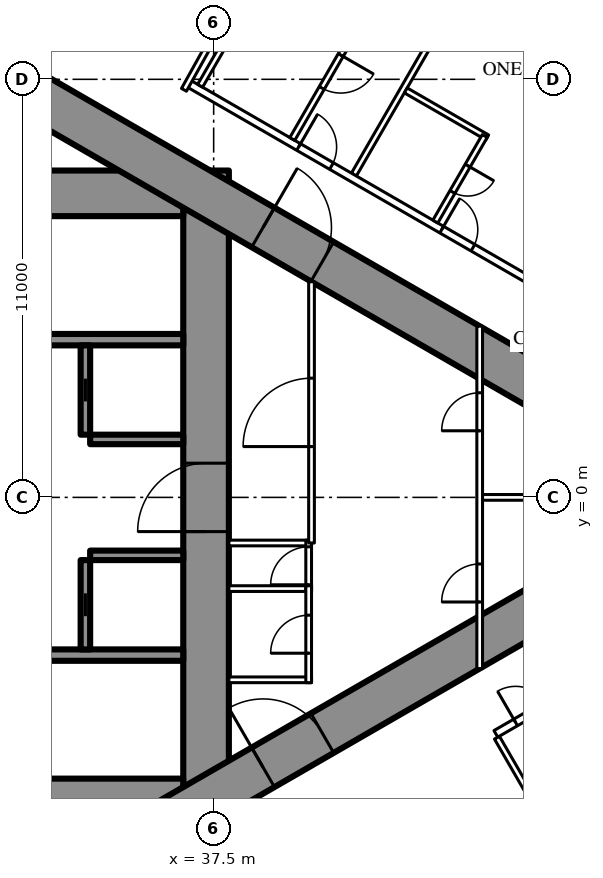
"""IFC4 building model, lengths in metres.
Left out: names, types, materials, properties, quantities, classifications, styles, units other than length and angle.
Written with IfcOpenShell. Run it as: python <this file> out.ifc"""

import sys

from ifc_helpers import new_model, si_unit, direction, frame, frame_2d, origin, place, context, subcontext, project, spatial, rectangle, extrude, element, fill, save


model = new_model("IFC4")
c1 = context("Model", 3, precision=1e-05, world=origin(), true_north=direction((0.0, 1.0)))
c2 = subcontext(c1, "Body", "Model", "MODEL_VIEW")
j1 = project(units=[si_unit("LENGTHUNIT", "METRE"), si_unit("PLANEANGLEUNIT", "RADIAN")], contexts=[c1])
p1 = place(None, origin())
s1 = spatial("IfcSite", under=j1, at=p1, CompositionType="ELEMENT")
p2 = place(p1, origin())
s2 = spatial("IfcBuilding", under=s1, at=p2, CompositionType="ELEMENT")
p3 = place(p2, frame((0.0, 0.0, 122.1)))
s3 = spatial("IfcBuildingStorey", under=s2, at=p3, CompositionType="ELEMENT", Elevation=122.1)
p4 = place(p3, frame((37.3, -8.6, 0.0), z_axis=(0.0, 0.0, 1.0), x_axis=(0.0, 1.0, 0.0)))
e1 = element("IfcWall", 1, at=p4, inside=s3, PredefinedType="SHEAR", context=c2, shape_type="SweptSolid", body=[
    extrude(rectangle(XDim=17.2, YDim=1.2, at=frame_2d((8.6, 0.0))), origin(), (0.0, 0.0, 1.0), 3.5),
])
p5 = place(p4, frame((7.7, 0.0, 0.0)))
e2 = element("IfcOpeningElement", 2, at=p5, cuts=e1, PredefinedType="OPENING", context=c2, shape_type="SweptSolid", body=[
    extrude(rectangle(XDim=1.8, YDim=2.2, at=frame_2d((0.9, 1.1))), frame((0.0, 0.61, 0.0), z_axis=(0.0, -1.0, 0.0), x_axis=(1.0, 0.0, 0.0)), (0.0, 0.0, 1.0), 1.22),
])
p6 = place(p3, frame((28.3, -8.0, 0.0), z_axis=(0.0, 0.0, 1.0), x_axis=(1.0, 0.0, 0.0)))
e3 = element("IfcWall", 3, at=p6, inside=s3, PredefinedType="SHEAR", context=c2, shape_type="SweptSolid", body=[
    extrude(rectangle(XDim=8.4, YDim=1.2, at=frame_2d((4.2, 0.0))), origin(), (0.0, 0.0, 1.0), 3.5),
])
p7 = place(p6, frame((0.25, 0.0, 0.0)))
e4 = element("IfcOpeningElement", 4, at=p7, cuts=e3, PredefinedType="OPENING", context=c2, shape_type="SweptSolid", body=[
    extrude(rectangle(XDim=1.0, YDim=2.2, at=frame_2d((0.5, 1.1))), frame((0.0, 0.61, 0.0), z_axis=(0.0, -1.0, 0.0), x_axis=(1.0, 0.0, 0.0)), (0.0, 0.0, 1.0), 1.22),
])
p8 = place(p3, frame((28.3, 8.0, 0.0), z_axis=(0.0, 0.0, 1.0), x_axis=(1.0, 0.0, 0.0)))
e5 = element("IfcWall", 5, at=p8, inside=s3, PredefinedType="SHEAR", context=c2, shape_type="SweptSolid", body=[
    extrude(rectangle(XDim=8.4, YDim=1.2, at=frame_2d((4.2, 0.0))), origin(), (0.0, 0.0, 1.0), 3.5),
])
p9 = place(p8, frame((0.25, 0.0, 0.0)))
e6 = element("IfcOpeningElement", 6, at=p9, cuts=e5, PredefinedType="OPENING", context=c2, shape_type="SweptSolid", body=[
    extrude(rectangle(XDim=1.0, YDim=2.2, at=frame_2d((0.5, 1.1))), frame((0.0, 0.61, 0.0), z_axis=(0.0, -1.0, 0.0), x_axis=(1.0, 0.0, 0.0)), (0.0, 0.0, 1.0), 1.22),
])
for number, where, z_axis, x_axis in (
    (7, (28.3, -4.15, 0.0), (0.0, 0.0, 1.0), (1.0, 0.0, 0.0)),
    (8, (28.3, 4.15, 0.0), (0.0, 0.0, 1.0), (1.0, 0.0, 0.0)),
):
    element("IfcWall", number, at=place(p3, frame(where, z_axis=z_axis, x_axis=x_axis)), inside=s3, PredefinedType="SHEAR", context=c2, shape_type="SweptSolid", body=[
        extrude(rectangle(XDim=8.4, YDim=0.3, at=frame_2d((4.2, 0.0))), origin(), (0.0, 0.0, 1.0), 3.5),
    ])
p10 = place(p3, frame((34.125, -4.0, 0.0), z_axis=(0.0, 0.0, 1.0), x_axis=(0.0, 1.0, 0.0)))
e9 = element("IfcWall", 9, at=p10, inside=s3, PredefinedType="SHEAR", context=c2, shape_type="SweptSolid", body=[
    extrude(rectangle(XDim=2.35, YDim=0.25, at=frame_2d((1.175, 0.0))), origin(), (0.0, 0.0, 1.0), 3.5),
])
p11 = place(p10, frame((0.875, 0.0, 0.0)))
e10 = element("IfcOpeningElement", 10, at=p11, cuts=e9, PredefinedType="OPENING", context=c2, shape_type="SweptSolid", body=[
    extrude(rectangle(XDim=0.6, YDim=2.0, at=frame_2d((0.3, 1.0))), frame((0.0, 0.135, 0.0), z_axis=(0.0, -1.0, 0.0), x_axis=(1.0, 0.0, 0.0)), (0.0, 0.0, 1.0), 0.27),
])
p12 = place(p3, frame((34.25, -1.525, 0.0), z_axis=(0.0, 0.0, 1.0), x_axis=(1.0, 0.0, 0.0)))
e11 = element("IfcWall", 11, at=p12, inside=s3, PredefinedType="SHEAR", context=c2, shape_type="SweptSolid", body=[
    extrude(rectangle(XDim=2.45, YDim=0.25, at=frame_2d((1.225, 0.0))), origin(), (0.0, 0.0, 1.0), 3.5),
])
p13 = place(p3, frame((34.125, 1.65, 0.0), z_axis=(0.0, 0.0, 1.0), x_axis=(0.0, 1.0, 0.0)))
e12 = element("IfcWall", 12, at=p13, inside=s3, PredefinedType="SHEAR", context=c2, shape_type="SweptSolid", body=[
    extrude(rectangle(XDim=2.35, YDim=0.25, at=frame_2d((1.175, 0.0))), origin(), (0.0, 0.0, 1.0), 3.5),
])
p14 = place(p13, frame((0.875, 0.0, 0.0)))
e13 = element("IfcOpeningElement", 13, at=p14, cuts=e12, PredefinedType="OPENING", context=c2, shape_type="SweptSolid", body=[
    extrude(rectangle(XDim=0.6, YDim=2.0, at=frame_2d((0.3, 1.0))), frame((0.0, 0.135, 0.0), z_axis=(0.0, -1.0, 0.0), x_axis=(1.0, 0.0, 0.0)), (0.0, 0.0, 1.0), 0.27),
])
p15 = place(p3, frame((34.25, 1.525, 0.0), z_axis=(0.0, 0.0, 1.0), x_axis=(1.0, 0.0, 0.0)))
e14 = element("IfcWall", 14, at=p15, inside=s3, PredefinedType="SHEAR", context=c2, shape_type="SweptSolid", body=[
    extrude(rectangle(XDim=2.45, YDim=0.25, at=frame_2d((1.225, 0.0))), origin(), (0.0, 0.0, 1.0), 3.5),
])
p16 = place(p3, frame((27.2, -13.8, 0.0), z_axis=(0.0, 0.0, 1.0), x_axis=(0.866027159892, 0.499996958321, 0.0)))
e15 = element("IfcWall", 15, at=p16, inside=s3, PredefinedType="SHEAR", context=c2, shape_type="SweptSolid", body=[
    extrude(rectangle(XDim=27.947, YDim=1.2, at=frame_2d((13.973, 0.0))), origin(), (0.0, 0.0, 1.0), 3.5),
])
p17 = place(p16, frame((4.6, 0.0, 0.0)))
e16 = element("IfcOpeningElement", 16, at=p17, cuts=e15, PredefinedType="OPENING", context=c2, shape_type="SweptSolid", body=[
    extrude(rectangle(XDim=1.0, YDim=2.2, at=frame_2d((0.5, 1.1))), frame((0.0, 0.61, 0.0), z_axis=(0.0, -1.0, 0.0), x_axis=(1.0, 0.0, 0.0)), (0.0, 0.0, 1.0), 1.22),
])
p18 = place(p16, frame((13.395, 0.0, 0.0)))
e17 = element("IfcOpeningElement", 17, at=p18, cuts=e15, PredefinedType="OPENING", context=c2, shape_type="SweptSolid", body=[
    extrude(rectangle(XDim=1.8, YDim=2.2, at=frame_2d((0.9, 1.1))), frame((0.0, 0.61, 0.0), z_axis=(0.0, -1.0, 0.0), x_axis=(1.0, 0.0, 0.0)), (0.0, 0.0, 1.0), 1.22),
])
p19 = place(p3, frame((27.2, 13.8, 0.0), z_axis=(0.0, 0.0, 1.0), x_axis=(0.866024515034, -0.500001539357, 0.0)))
e18 = element("IfcWall", 18, at=p19, inside=s3, PredefinedType="SHEAR", context=c2, shape_type="SweptSolid", body=[
    extrude(rectangle(XDim=26.907, YDim=1.2, at=frame_2d((13.454, 0.0))), origin(), (0.0, 0.0, 1.0), 3.5),
])
p20 = place(p19, frame((4.6, 0.0, 0.0)))
e19 = element("IfcOpeningElement", 19, at=p20, cuts=e18, PredefinedType="OPENING", context=c2, shape_type="SweptSolid", body=[
    extrude(rectangle(XDim=1.0, YDim=2.2, at=frame_2d((0.5, 1.1))), frame((0.0, 0.61, 0.0), z_axis=(0.0, -1.0, 0.0), x_axis=(1.0, 0.0, 0.0)), (0.0, 0.0, 1.0), 1.22),
])
p21 = place(p19, frame((13.395, 0.0, 0.0)))
e20 = element("IfcOpeningElement", 20, at=p21, cuts=e18, PredefinedType="OPENING", context=c2, shape_type="SweptSolid", body=[
    extrude(rectangle(XDim=1.8, YDim=2.2, at=frame_2d((0.9, 1.1))), frame((0.0, 0.61, 0.0), z_axis=(0.0, -1.0, 0.0), x_axis=(1.0, 0.0, 0.0)), (0.0, 0.0, 1.0), 1.22),
])
p22 = place(p3, frame((44.954, -6.321, 0.0), z_axis=(0.0, 0.0, 1.0), x_axis=(0.500018676722, -0.866014620505, 0.0)))
e21 = element("IfcWall", 21, at=p22, inside=s3, PredefinedType="PARTITIONING", context=c2, shape_type="SweptSolid", body=[
    extrude(rectangle(XDim=8.704, YDim=0.15, at=frame_2d((4.352, 0.0))), origin(), (0.0, 0.0, 1.0), 2.2),
])
p23 = place(p3, frame((41.19, 8.494, 0.0), z_axis=(0.0, 0.0, 1.0), x_axis=(0.49999258054, 0.866029687369, 0.0)))
e22 = element("IfcWall", 22, at=p23, inside=s3, PredefinedType="PARTITIONING", context=c2, shape_type="SweptSolid", body=[
    extrude(rectangle(XDim=11.318, YDim=0.15, at=frame_2d((5.659, 0.0))), origin(), (0.0, 0.0, 1.0), 3.25),
])
p24 = place(p3, frame((36.834, 10.894, 0.0), z_axis=(0.0, 0.0, 1.0), x_axis=(0.866028157229, -0.499995230863, 0.0)))
e23 = element("IfcWall", 23, at=p24, inside=s3, PredefinedType="PARTITIONING", context=c2, shape_type="SweptSolid", body=[
    extrude(rectangle(XDim=21.667, YDim=0.2, at=frame_2d((10.833, 0.0))), origin(), (0.0, 0.0, 1.0), 3.25),
])
p25 = place(p24, frame((20.117, 0.0, 0.0)))
e24 = element("IfcOpeningElement", 24, at=p25, cuts=e23, PredefinedType="OPENING", context=c2, shape_type="SweptSolid", body=[
    extrude(rectangle(XDim=0.95, YDim=2.2, at=frame_2d((0.475, 1.1))), frame((0.0, 0.11, 0.0), z_axis=(0.0, -1.0, 0.0), x_axis=(1.0, 0.0, 0.0)), (0.0, 0.0, 1.0), 0.22),
])
p26 = place(p24, frame((14.04, 0.0, 0.0)))
e25 = element("IfcOpeningElement", 25, at=p26, cuts=e23, PredefinedType="OPENING", context=c2, shape_type="SweptSolid", body=[
    extrude(rectangle(XDim=0.95, YDim=2.2, at=frame_2d((0.475, 1.1))), frame((0.0, 0.11, 0.0), z_axis=(0.0, -1.0, 0.0), x_axis=(1.0, 0.0, 0.0)), (0.0, 0.0, 1.0), 0.22),
])
p27 = place(p24, frame((7.697, 0.0, 0.0)))
e26 = element("IfcOpeningElement", 26, at=p27, cuts=e23, PredefinedType="OPENING", context=c2, shape_type="SweptSolid", body=[
    extrude(rectangle(XDim=0.95, YDim=2.2, at=frame_2d((0.475, 1.1))), frame((0.0, 0.11, 0.0), z_axis=(0.0, -1.0, 0.0), x_axis=(1.0, 0.0, 0.0)), (0.0, 0.0, 1.0), 0.22),
])
p28 = place(p24, frame((3.35, 0.0, 0.0)))
e27 = element("IfcOpeningElement", 27, at=p28, cuts=e23, PredefinedType="OPENING", context=c2, shape_type="SweptSolid", body=[
    extrude(rectangle(XDim=1.0, YDim=2.2, at=frame_2d((0.5, 1.1))), frame((0.0, 0.11, 0.0), z_axis=(0.0, -1.0, 0.0), x_axis=(1.0, 0.0, 0.0)), (0.0, 0.0, 1.0), 0.22),
])
p29 = place(p3, frame((36.719, 10.723, 0.0), z_axis=(0.0, 0.0, 1.0), x_axis=(0.486348184724, 0.87376509613, 0.0)))
e28 = element("IfcWall", 28, at=p29, inside=s3, PredefinedType="PARTITIONING", context=c2, shape_type="SweptSolid", body=[
    extrude(rectangle(XDim=1.91, YDim=0.15, at=frame_2d((0.955, 0.0))), origin(), (0.0, 0.0, 1.0), 3.25),
])
p30 = place(p3, frame((44.925, -6.222, 0.0), z_axis=(0.0, 0.0, 1.0), x_axis=(0.866020269055, 0.500008893506, 0.0)))
e29 = element("IfcWall", 29, at=p30, inside=s3, PredefinedType="PARTITIONING", context=c2, shape_type="SweptSolid", body=[
    extrude(rectangle(XDim=12.444, YDim=0.2, at=frame_2d((6.222, 0.0))), origin(), (0.0, 0.0, 1.0), 3.25),
])
p31 = place(p30, frame((0.6, 0.0, 0.0)))
e30 = element("IfcOpeningElement", 30, at=p31, cuts=e29, PredefinedType="OPENING", context=c2, shape_type="SweptSolid", body=[
    extrude(rectangle(XDim=0.95, YDim=2.2, at=frame_2d((0.475, 1.1))), frame((0.0, 0.11, 0.0), z_axis=(0.0, -1.0, 0.0), x_axis=(1.0, 0.0, 0.0)), (0.0, 0.0, 1.0), 0.22),
])
p32 = place(p30, frame((7.047, 0.0, 0.0)))
e31 = element("IfcOpeningElement", 31, at=p32, cuts=e29, PredefinedType="OPENING", context=c2, shape_type="SweptSolid", body=[
    extrude(rectangle(XDim=0.95, YDim=2.2, at=frame_2d((0.475, 1.1))), frame((0.0, 0.11, 0.0), z_axis=(0.0, -1.0, 0.0), x_axis=(1.0, 0.0, 0.0)), (0.0, 0.0, 1.0), 0.22),
])
p33 = place(p3, frame((42.555, 10.708, 0.0), z_axis=(0.0, 0.0, 1.0), x_axis=(0.866073894602, -0.499916002032, 0.0)))
e32 = element("IfcWall", 32, at=p33, inside=s3, PredefinedType="PARTITIONING", context=c2, shape_type="SweptSolid", body=[
    extrude(rectangle(XDim=2.475, YDim=0.15, at=frame_2d((1.238, 0.0))), origin(), (0.0, 0.0, 1.0), 3.25),
])
p34 = place(p3, frame((43.333, 7.257, 0.0), z_axis=(0.0, 0.0, 1.0), x_axis=(0.500006934395, 0.866021400173, 0.0)))
e33 = element("IfcWall", 33, at=p34, inside=s3, PredefinedType="PARTITIONING", context=c2, shape_type="SweptSolid", body=[
    extrude(rectangle(XDim=2.6, YDim=0.15, at=frame_2d((1.3, 0.0))), origin(), (0.0, 0.0, 1.0), 3.25),
])
p35 = place(p34, frame((0.9, 0.0, 0.0)))
e34 = element("IfcOpeningElement", 34, at=p35, cuts=e33, PredefinedType="OPENING", context=c2, shape_type="SweptSolid", body=[
    extrude(rectangle(XDim=0.8, YDim=2.2, at=frame_2d((0.4, 1.1))), frame((0.0, 0.085, 0.0), z_axis=(0.0, -1.0, 0.0), x_axis=(1.0, 0.0, 0.0)), (0.0, 0.0, 1.0), 0.17),
])
p36 = place(p3, frame((39.569, 9.43, 0.0), z_axis=(0.0, 0.0, 1.0), x_axis=(0.49998411664, 0.866034573852, 0.0)))
e35 = element("IfcWall", 35, at=p36, inside=s3, PredefinedType="PARTITIONING", context=c2, shape_type="SweptSolid", body=[
    extrude(rectangle(XDim=2.8, YDim=0.15, at=frame_2d((1.4, 0.0))), origin(), (0.0, 0.0, 1.0), 3.25),
])
p37 = place(p36, frame((1.55, 0.0, 0.0)))
e36 = element("IfcOpeningElement", 36, at=p37, cuts=e35, PredefinedType="OPENING", context=c2, shape_type="SweptSolid", body=[
    extrude(rectangle(XDim=1.0, YDim=2.2, at=frame_2d((0.5, 1.1))), frame((0.0, 0.085, 0.0), z_axis=(0.0, -1.0, 0.0), x_axis=(1.0, 0.0, 0.0)), (0.0, 0.0, 1.0), 0.17),
])
p38 = place(p3, frame((37.144, 10.83, 0.0), z_axis=(0.0, 0.0, 1.0), x_axis=(0.500011755427, 0.866018616679, 0.0)))
e37 = element("IfcWall", 37, at=p38, inside=s3, PredefinedType="PARTITIONING", context=c2, shape_type="SweptSolid", body=[
    extrude(rectangle(XDim=2.8, YDim=0.15, at=frame_2d((1.4, 0.0))), origin(), (0.0, 0.0, 1.0), 3.25),
])
for number, where, z_axis, x_axis in (
    (38, (37.9, -1.2, 0.0), (0.0, 0.0, 1.0), (1.0, 0.0, 0.0)),
    (39, (37.9, -2.4, 0.0), (0.0, 0.0, 1.0), (1.0, 0.0, 0.0)),
    (40, (37.9, -4.8, 0.0), (0.0, 0.0, 1.0), (1.0, 0.0, 0.0)),
):
    element("IfcWall", number, at=place(p3, frame(where, z_axis=z_axis, x_axis=x_axis)), inside=s3, PredefinedType="PARTITIONING", context=c2, shape_type="SweptSolid", body=[
        extrude(rectangle(XDim=2.175, YDim=0.15, at=frame_2d((1.087, 0.0))), origin(), (0.0, 0.0, 1.0), 3.25),
    ])
p39 = place(p3, frame((40.0, -2.475, 0.0), z_axis=(0.0, 0.0, 1.0), x_axis=(0.0, 1.0, 0.0)))
e41 = element("IfcWall", 41, at=p39, inside=s3, PredefinedType="PARTITIONING", context=c2, shape_type="SweptSolid", body=[
    extrude(rectangle(XDim=1.35, YDim=0.15, at=frame_2d((0.675, 0.0))), origin(), (0.0, 0.0, 1.0), 3.25),
])
p40 = place(p39, frame((0.175, 0.0, 0.0)))
e42 = element("IfcOpeningElement", 42, at=p40, cuts=e41, PredefinedType="OPENING", context=c2, shape_type="SweptSolid", body=[
    extrude(rectangle(XDim=1.0, YDim=2.2, at=frame_2d((0.5, 1.1))), frame((0.0, 0.085, 0.0), z_axis=(0.0, -1.0, 0.0), x_axis=(1.0, 0.0, 0.0)), (0.0, 0.0, 1.0), 0.17),
])
p41 = place(p3, frame((40.0, -4.875, 0.0), z_axis=(0.0, 0.0, 1.0), x_axis=(0.0, 1.0, 0.0)))
e43 = element("IfcWall", 43, at=p41, inside=s3, PredefinedType="PARTITIONING", context=c2, shape_type="SweptSolid", body=[
    extrude(rectangle(XDim=2.55, YDim=0.15, at=frame_2d((1.275, 0.0))), origin(), (0.0, 0.0, 1.0), 3.25),
])
p42 = place(p41, frame((0.775, 0.0, 0.0)))
e44 = element("IfcOpeningElement", 44, at=p42, cuts=e43, PredefinedType="OPENING", context=c2, shape_type="SweptSolid", body=[
    extrude(rectangle(XDim=1.0, YDim=2.2, at=frame_2d((0.5, 1.1))), frame((0.0, 0.085, 0.0), z_axis=(0.0, -1.0, 0.0), x_axis=(1.0, 0.0, 0.0)), (0.0, 0.0, 1.0), 0.17),
])
p43 = place(p3, frame((40.075, -1.2, 0.0), z_axis=(0.0, 0.0, 1.0), x_axis=(0.0, 1.0, 0.0)))
e45 = element("IfcWall", 45, at=p43, inside=s3, PredefinedType="PARTITIONING", context=c2, shape_type="SweptSolid", body=[
    extrude(rectangle(XDim=6.874, YDim=0.15, at=frame_2d((3.437, 0.0))), origin(), (0.0, 0.0, 1.0), 3.25),
])
p44 = place(p43, frame((2.537, 0.0, 0.0)))
e46 = element("IfcOpeningElement", 46, at=p44, cuts=e45, PredefinedType="OPENING", context=c2, shape_type="SweptSolid", body=[
    extrude(rectangle(XDim=1.8, YDim=2.2, at=frame_2d((0.9, 1.1))), frame((0.0, 0.085, 0.0), z_axis=(0.0, -1.0, 0.0), x_axis=(1.0, 0.0, 0.0)), (0.0, 0.0, 1.0), 0.17),
])
p45 = place(p3, frame((44.5, -4.505, 0.0), z_axis=(0.0, 0.0, 1.0), x_axis=(0.0, 1.0, 0.0)))
e47 = element("IfcWall", 47, at=p45, inside=s3, PredefinedType="PARTITIONING", context=c2, shape_type="SweptSolid", body=[
    extrude(rectangle(XDim=9.009, YDim=0.15, at=frame_2d((4.505, 0.0))), origin(), (0.0, 0.0, 1.0), 2.45),
])
p46 = place(p45, frame((1.752, 0.0, 0.0)))
e48 = element("IfcOpeningElement", 48, at=p46, cuts=e47, PredefinedType="OPENING", context=c2, shape_type="SweptSolid", body=[
    extrude(rectangle(XDim=1.0, YDim=2.2, at=frame_2d((0.5, 1.1))), frame((0.0, 0.085, 0.0), z_axis=(0.0, -1.0, 0.0), x_axis=(1.0, 0.0, 0.0)), (0.0, 0.0, 1.0), 0.17),
])
p47 = place(p45, frame((6.257, 0.0, 0.0)))
e49 = element("IfcOpeningElement", 49, at=p47, cuts=e47, PredefinedType="OPENING", context=c2, shape_type="SweptSolid", body=[
    extrude(rectangle(XDim=1.0, YDim=2.2, at=frame_2d((0.5, 1.1))), frame((0.0, 0.085, 0.0), z_axis=(0.0, -1.0, 0.0), x_axis=(1.0, 0.0, 0.0)), (0.0, 0.0, 1.0), 0.17),
])
p48 = place(p3, frame((44.575, 0.0, 0.0), z_axis=(0.0, 0.0, 1.0), x_axis=(1.0, 0.0, 0.0)))
e50 = element("IfcWall", 50, at=p48, inside=s3, PredefinedType="PARTITIONING", context=c2, shape_type="SweptSolid", body=[
    extrude(rectangle(XDim=7.727, YDim=0.15, at=frame_2d((3.864, 0.0))), origin(), (0.0, 0.0, 1.0), 2.2),
])
p49 = place(p31, origin())
e51 = element("IfcDoor", 51, at=p49, inside=s3, OperationType="SINGLE_SWING_LEFT", PredefinedType="DOOR", context=c2, shape_type="SweptSolid", body=[
    extrude(rectangle(XDim=0.95, YDim=2.2, at=frame_2d((0.475, 1.1))), frame((0.0, 0.025, 0.0), z_axis=(0.0, -1.0, 0.0), x_axis=(1.0, 0.0, 0.0)), (0.0, 0.0, 1.0), 0.05),
])
fill(e30, e51)
p50 = place(p35, origin())
e52 = element("IfcDoor", 52, at=p50, inside=s3, OperationType="SINGLE_SWING_RIGHT", PredefinedType="DOOR", context=c2, shape_type="SweptSolid", body=[
    extrude(rectangle(XDim=0.8, YDim=2.2, at=frame_2d((0.4, 1.1))), frame((0.0, 0.025, 0.0), z_axis=(0.0, -1.0, 0.0), x_axis=(1.0, 0.0, 0.0)), (0.0, 0.0, 1.0), 0.05),
])
fill(e34, e52)
p51 = place(p27, origin())
e53 = element("IfcDoor", 53, at=p51, inside=s3, OperationType="SINGLE_SWING_LEFT", PredefinedType="DOOR", context=c2, shape_type="SweptSolid", body=[
    extrude(rectangle(XDim=0.95, YDim=2.2, at=frame_2d((0.475, 1.1))), frame((0.0, 0.025, 0.0), z_axis=(0.0, -1.0, 0.0), x_axis=(1.0, 0.0, 0.0)), (0.0, 0.0, 1.0), 0.05),
])
fill(e26, e53)
p52 = place(p37, origin())
e54 = element("IfcDoor", 54, at=p52, inside=s3, OperationType="SINGLE_SWING_RIGHT", PredefinedType="DOOR", context=c2, shape_type="SweptSolid", body=[
    extrude(rectangle(XDim=1.0, YDim=2.2, at=frame_2d((0.5, 1.1))), frame((0.0, 0.025, 0.0), z_axis=(0.0, -1.0, 0.0), x_axis=(1.0, 0.0, 0.0)), (0.0, 0.0, 1.0), 0.05),
])
fill(e36, e54)
p53 = place(p28, origin())
e55 = element("IfcDoor", 55, at=p53, inside=s3, OperationType="SINGLE_SWING_LEFT", PredefinedType="DOOR", context=c2, shape_type="SweptSolid", body=[
    extrude(rectangle(XDim=1.0, YDim=2.2, at=frame_2d((0.5, 1.1))), frame((0.0, 0.025, 0.0), z_axis=(0.0, -1.0, 0.0), x_axis=(1.0, 0.0, 0.0)), (0.0, 0.0, 1.0), 0.05),
])
fill(e27, e55)
p54 = place(p40, origin())
e56 = element("IfcDoor", 56, at=p54, inside=s3, OperationType="SINGLE_SWING_LEFT", PredefinedType="DOOR", context=c2, shape_type="SweptSolid", body=[
    extrude(rectangle(XDim=1.0, YDim=2.2, at=frame_2d((0.5, 1.1))), frame((0.0, 0.025, 0.0), z_axis=(0.0, -1.0, 0.0), x_axis=(1.0, 0.0, 0.0)), (0.0, 0.0, 1.0), 0.05),
])
fill(e42, e56)
p55 = place(p42, origin())
e57 = element("IfcDoor", 57, at=p55, inside=s3, OperationType="SINGLE_SWING_LEFT", PredefinedType="DOOR", context=c2, shape_type="SweptSolid", body=[
    extrude(rectangle(XDim=1.0, YDim=2.2, at=frame_2d((0.5, 1.1))), frame((0.0, 0.025, 0.0), z_axis=(0.0, -1.0, 0.0), x_axis=(1.0, 0.0, 0.0)), (0.0, 0.0, 1.0), 0.05),
])
fill(e44, e57)
p56 = place(p44, origin())
e58 = element("IfcDoor", 58, at=p56, inside=s3, OperationType="DOUBLE_DOOR_SINGLE_SWING", PredefinedType="DOOR", context=c2, shape_type="SweptSolid", body=[
    extrude(rectangle(XDim=1.8, YDim=2.2, at=frame_2d((0.9, 1.1))), frame((0.0, 0.025, 0.0), z_axis=(0.0, -1.0, 0.0), x_axis=(1.0, 0.0, 0.0)), (0.0, 0.0, 1.0), 0.05),
])
fill(e46, e58)
p57 = place(p46, origin())
e59 = element("IfcDoor", 59, at=p57, inside=s3, OperationType="SINGLE_SWING_LEFT", PredefinedType="DOOR", context=c2, shape_type="SweptSolid", body=[
    extrude(rectangle(XDim=1.0, YDim=2.2, at=frame_2d((0.5, 1.1))), frame((0.0, 0.025, 0.0), z_axis=(0.0, -1.0, 0.0), x_axis=(1.0, 0.0, 0.0)), (0.0, 0.0, 1.0), 0.05),
])
fill(e48, e59)
p58 = place(p47, origin())
e60 = element("IfcDoor", 60, at=p58, inside=s3, OperationType="SINGLE_SWING_LEFT", PredefinedType="DOOR", context=c2, shape_type="SweptSolid", body=[
    extrude(rectangle(XDim=1.0, YDim=2.2, at=frame_2d((0.5, 1.1))), frame((0.0, 0.025, 0.0), z_axis=(0.0, -1.0, 0.0), x_axis=(1.0, 0.0, 0.0)), (0.0, 0.0, 1.0), 0.05),
])
fill(e49, e60)
p59 = place(p18, origin())
e61 = element("IfcDoor", 61, at=p59, inside=s3, OperationType="DOUBLE_DOOR_SINGLE_SWING", PredefinedType="DOOR", context=c2, shape_type="SweptSolid", body=[
    extrude(rectangle(XDim=1.8, YDim=2.2, at=frame_2d((0.9, 1.1))), frame((0.0, 0.025, 0.0), z_axis=(0.0, -1.0, 0.0), x_axis=(1.0, 0.0, 0.0)), (0.0, 0.0, 1.0), 0.05),
])
fill(e17, e61)
p60 = place(p21, origin())
e62 = element("IfcDoor", 62, at=p60, inside=s3, OperationType="DOUBLE_DOOR_SINGLE_SWING", PredefinedType="DOOR", context=c2, shape_type="SweptSolid", body=[
    extrude(rectangle(XDim=1.8, YDim=2.2, at=frame_2d((0.9, 1.1))), frame((0.0, 0.025, 0.0), z_axis=(0.0, -1.0, 0.0), x_axis=(1.0, 0.0, 0.0)), (0.0, 0.0, 1.0), 0.05),
])
fill(e20, e62)
p61 = place(p5, origin())
e63 = element("IfcDoor", 63, at=p61, inside=s3, OperationType="DOUBLE_DOOR_SINGLE_SWING", PredefinedType="DOOR", context=c2, shape_type="SweptSolid", body=[
    extrude(rectangle(XDim=1.8, YDim=2.2, at=frame_2d((0.9, 1.1))), frame((0.0, 0.025, 0.0), z_axis=(0.0, -1.0, 0.0), x_axis=(1.0, 0.0, 0.0)), (0.0, 0.0, 1.0), 0.05),
])
fill(e2, e63)
p62 = place(p11, origin())
e64 = element("IfcDoor", 64, at=p62, inside=s3, OperationType="SLIDING_TO_LEFT", PredefinedType="DOOR", context=c2, shape_type="SweptSolid", body=[
    extrude(rectangle(XDim=0.6, YDim=2.0, at=frame_2d((0.3, 1.0))), frame((0.0, 0.025, 0.0), z_axis=(0.0, -1.0, 0.0), x_axis=(1.0, 0.0, 0.0)), (0.0, 0.0, 1.0), 0.05),
])
fill(e10, e64)
p63 = place(p14, origin())
e65 = element("IfcDoor", 65, at=p63, inside=s3, OperationType="SLIDING_TO_LEFT", PredefinedType="DOOR", context=c2, shape_type="SweptSolid", body=[
    extrude(rectangle(XDim=0.6, YDim=2.0, at=frame_2d((0.3, 1.0))), frame((0.0, 0.025, 0.0), z_axis=(0.0, -1.0, 0.0), x_axis=(1.0, 0.0, 0.0)), (0.0, 0.0, 1.0), 0.05),
])
fill(e13, e65)
save(model, sys.argv[1])
